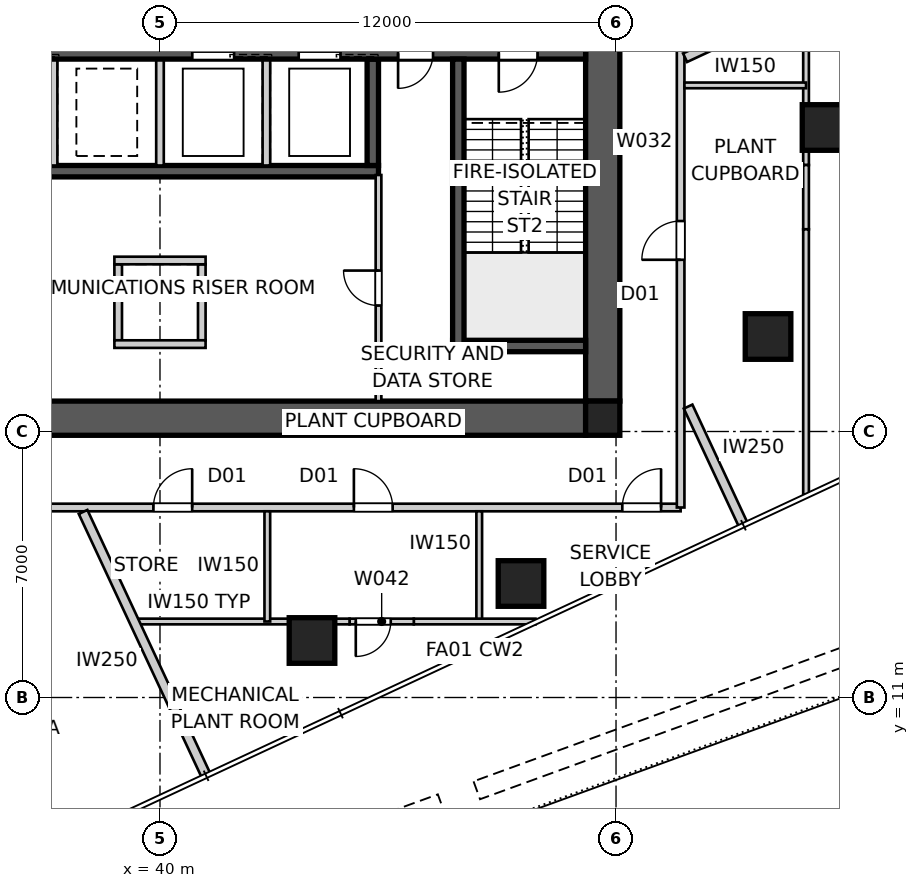
"""IFC4 building model, lengths in metres.
Left out: names, types, materials, properties, quantities, classifications, styles, units other than length and angle.
Written with IfcOpenShell. Run it as: python <this file> out.ifc"""

import sys

from ifc_helpers import new_model, si_unit, direction, frame, frame_2d, origin, origin_2d, place, context, subcontext, project, spatial, polyline, rectangle, outline, extrude, element, fill, save


model = new_model("IFC4")
c1 = context("Model", 3, precision=1e-05, world=origin(), true_north=direction((0.0, 1.0)))
c2 = subcontext(c1, "Body", "Model", "MODEL_VIEW")
j1 = project(units=[si_unit("LENGTHUNIT", "METRE"), si_unit("PLANEANGLEUNIT", "RADIAN")], contexts=[c1])
p1 = place(None, origin())
s1 = spatial("IfcSite", under=j1, at=p1, CompositionType="ELEMENT")
p2 = place(p1, origin())
s2 = spatial("IfcBuilding", under=s1, at=p2, CompositionType="ELEMENT")
p3 = place(p2, frame((0.0, 0.0, 171.0)))
s3 = spatial("IfcBuildingStorey", under=s2, at=p3, CompositionType="ELEMENT", Elevation=171.0)
p4 = place(p3, frame((51.2, 18.35, 0.0), z_axis=(0.0, 0.0, 1.0), x_axis=(-1.0, 0.0, 0.0)))
e1 = element("IfcWall", 1, at=p4, inside=s3, PredefinedType="SHEAR", context=c2, shape_type="SweptSolid", body=[
    extrude(outline(polyline([(0.0, -0.45), (22.4, -0.45), (22.4, -0.025), (22.85, -0.025), (22.85, 0.025), (22.4, 0.025), (22.4, 0.45), (0.0, 0.45), (0.0, 0.025), (-0.45, 0.025), (-0.45, -0.025), (0.0, -0.025), (0.0, -0.45)])), origin(), (0.0, 0.0, 1.0), 5.0),
])
p5 = place(p3, frame((51.65, 18.8, 0.0), z_axis=(0.0, 0.0, 1.0), x_axis=(0.0, 1.0, 0.0)))
e2 = element("IfcWall", 2, at=p5, inside=s3, PredefinedType="SHEAR", context=c2, shape_type="SweptSolid", body=[
    extrude(outline(polyline([(0.0, -0.45), (22.4, -0.45), (22.4, -0.025), (22.85, -0.025), (22.85, 0.025), (22.4, 0.025), (22.4, 0.45), (0.0, 0.45), (0.0, 0.025), (-0.45, 0.025), (-0.45, -0.025), (0.0, -0.025), (0.0, -0.45)])), origin(), (0.0, 0.0, 1.0), 5.0),
])
p6 = place(p5, frame((11.14, 0.0, 0.0)))
e3 = element("IfcOpeningElement", 3, at=p6, cuts=e2, PredefinedType="OPENING", context=c2, shape_type="SweptSolid", body=[
    extrude(rectangle(XDim=1.02, YDim=2.4, at=frame_2d((0.51, 1.2))), frame((0.0, 0.46, 0.0), z_axis=(0.0, -1.0, 0.0), x_axis=(1.0, 0.0, 0.0)), (0.0, 0.0, 1.0), 0.92),
])
p7 = place(p3, frame((51.2, 27.95, 0.0), z_axis=(0.0, 0.0, 1.0), x_axis=(-1.0, 0.0, 0.0)))
e4 = element("IfcWall", 4, at=p7, inside=s3, PredefinedType="SHEAR", context=c2, shape_type="SweptSolid", body=[
    extrude(rectangle(XDim=22.4, YDim=0.3, at=frame_2d((11.2, 0.0))), origin(), (0.0, 0.0, 1.0), 5.0),
])
p8 = place(p7, frame((19.04, 0.0, 0.0)))
e5 = element("IfcOpeningElement", 5, at=p8, cuts=e4, PredefinedType="OPENING", context=c2, shape_type="SweptSolid", body=[
    extrude(rectangle(XDim=0.92, YDim=2.1, at=frame_2d((0.46, 1.05))), frame((0.0, 0.16, 0.0), z_axis=(0.0, -1.0, 0.0), x_axis=(1.0, 0.0, 0.0)), (0.0, 0.0, 1.0), 0.32),
])
p9 = place(p7, frame((1.265, 0.0, 0.0)))
e6 = element("IfcOpeningElement", 6, at=p9, cuts=e4, PredefinedType="OPENING", context=c2, shape_type="SweptSolid", body=[
    extrude(rectangle(XDim=1.02, YDim=2.1, at=frame_2d((0.51, 1.05))), frame((0.0, 0.16, 0.0), z_axis=(0.0, -1.0, 0.0), x_axis=(1.0, 0.0, 0.0)), (0.0, 0.0, 1.0), 0.32),
])
p10 = place(p7, frame((4.015, 0.0, 0.0)))
e7 = element("IfcOpeningElement", 7, at=p10, cuts=e4, PredefinedType="OPENING", context=c2, shape_type="SweptSolid", body=[
    extrude(rectangle(XDim=0.92, YDim=2.1, at=frame_2d((0.46, 1.05))), frame((0.0, 0.16, 0.0), z_axis=(0.0, -1.0, 0.0), x_axis=(1.0, 0.0, 0.0)), (0.0, 0.0, 1.0), 0.32),
])
p11 = place(p7, frame((6.45, 0.0, 0.0)))
e8 = element("IfcOpeningElement", 8, at=p11, cuts=e4, PredefinedType="OPENING", context=c2, shape_type="SweptSolid", body=[
    extrude(rectangle(XDim=1.1, YDim=2.1, at=frame_2d((0.55, 1.05))), frame((0.0, 0.16, 0.0), z_axis=(0.0, -1.0, 0.0), x_axis=(1.0, 0.0, 0.0)), (0.0, 0.0, 1.0), 0.32),
])
p12 = place(p7, frame((9.25, 0.0, 0.0)))
e9 = element("IfcOpeningElement", 9, at=p12, cuts=e4, PredefinedType="OPENING", context=c2, shape_type="SweptSolid", body=[
    extrude(rectangle(XDim=1.1, YDim=2.1, at=frame_2d((0.55, 1.05))), frame((0.0, 0.16, 0.0), z_axis=(0.0, -1.0, 0.0), x_axis=(1.0, 0.0, 0.0)), (0.0, 0.0, 1.0), 0.32),
])
p13 = place(p7, frame((14.85, 0.0, 0.0)))
e10 = element("IfcOpeningElement", 10, at=p13, cuts=e4, PredefinedType="OPENING", context=c2, shape_type="SweptSolid", body=[
    extrude(rectangle(XDim=1.1, YDim=2.1, at=frame_2d((0.55, 1.05))), frame((0.0, 0.16, 0.0), z_axis=(0.0, -1.0, 0.0), x_axis=(1.0, 0.0, 0.0)), (0.0, 0.0, 1.0), 0.32),
])
p14 = place(p3, frame((45.75, 24.85, 0.0), z_axis=(0.0, 0.0, 1.0), x_axis=(-1.0, 0.0, 0.0)))
e11 = element("IfcWall", 11, at=p14, inside=s3, PredefinedType="SHEAR", context=c2, shape_type="SweptSolid", body=[
    extrude(rectangle(XDim=11.5, YDim=0.3, at=frame_2d((5.75, 0.0))), origin(), (0.0, 0.0, 1.0), 5.0),
])
p15 = place(p3, frame((45.6, 27.8, 0.0), z_axis=(0.0, 0.0, 1.0), x_axis=(0.0, -1.0, 0.0)))
e12 = element("IfcWall", 12, at=p15, inside=s3, PredefinedType="SHEAR", context=c2, shape_type="SweptSolid", body=[
    extrude(rectangle(XDim=2.8, YDim=0.3, at=frame_2d((1.4, 0.0))), origin(), (0.0, 0.0, 1.0), 5.0),
])
for number, where, z_axis, x_axis in (
    (13, (42.8, 27.8, 0.0), (0.0, 0.0, 1.0), (0.0, -1.0, 0.0)),
    (14, (40.0, 27.8, 0.0), (0.0, 0.0, 1.0), (0.0, -1.0, 0.0)),
    (15, (37.2, 27.8, 0.0), (0.0, 0.0, 1.0), (0.0, -1.0, 0.0)),
):
    element("IfcWall", number, at=place(p3, frame(where, z_axis=z_axis, x_axis=x_axis)), inside=s3, PredefinedType="SOLIDWALL", context=c2, shape_type="SweptSolid", body=[
        extrude(rectangle(XDim=2.8, YDim=0.2, at=frame_2d((1.4, 0.0))), origin(), (0.0, 0.0, 1.0), 5.0),
    ])
p16 = place(p3, frame((47.85, 27.8, 0.0), z_axis=(0.0, 0.0, 1.0), x_axis=(0.0, -1.0, 0.0)))
e16 = element("IfcWall", 16, at=p16, inside=s3, PredefinedType="SHEAR", context=c2, shape_type="SweptSolid", body=[
    extrude(rectangle(XDim=7.7, YDim=0.3, at=frame_2d((3.85, 0.0))), origin(), (0.0, 0.0, 1.0), 5.0),
])
p17 = place(p3, frame((51.2, 20.25, 0.0), z_axis=(0.0, 0.0, 1.0), x_axis=(-1.0, 0.0, 0.0)))
e17 = element("IfcWall", 17, at=p17, inside=s3, PredefinedType="SHEAR", context=c2, shape_type="SweptSolid", body=[
    extrude(rectangle(XDim=3.5, YDim=0.3, at=frame_2d((1.75, 0.0))), origin(), (0.0, 0.0, 1.0), 5.0),
])
for number, where, z_axis, x_axis in (
    (18, (38.9, 22.4, 0.0), (0.0, 0.0, 1.0), (0.0, -1.0, 0.0)),
    (19, (41.1, 22.4, 0.0), (0.0, 0.0, 1.0), (0.0, -1.0, 0.0)),
):
    element("IfcWall", number, at=place(p3, frame(where, z_axis=z_axis, x_axis=x_axis)), inside=s3, PredefinedType="SOLIDWALL", context=c2, shape_type="SweptSolid", body=[
        extrude(rectangle(XDim=2.0, YDim=0.2, at=frame_2d((1.0, 0.0))), origin(), (0.0, 0.0, 1.0), 5.0),
    ])
for number, where, z_axis, x_axis in (
    (20, (38.8, 22.5, 0.0), (0.0, 0.0, 1.0), (1.0, 0.0, 0.0)),
    (21, (38.8, 20.3, 0.0), (0.0, 0.0, 1.0), (1.0, 0.0, 0.0)),
):
    element("IfcWall", number, at=place(p3, frame(where, z_axis=z_axis, x_axis=x_axis)), inside=s3, PredefinedType="SOLIDWALL", context=c2, shape_type="SweptSolid", body=[
        extrude(rectangle(XDim=2.4, YDim=0.2, at=frame_2d((1.2, 0.0))), origin(), (0.0, 0.0, 1.0), 5.0),
    ])
p18 = place(p3, frame((51.65, 18.35, 0.0), z_axis=(0.0, 0.0, 1.0), x_axis=(1.0, 0.0, 0.0)))
e22 = element("IfcColumn", 22, at=p18, inside=s3, PredefinedType="COLUMN", context=c2, shape_type="SweptSolid", body=[
    extrude(rectangle(XDim=0.9, YDim=0.9, at=origin_2d()), origin(), (0.0, 0.0, 1.0), 5.0),
])
for number, where, z_axis, x_axis in (
    (23, (57.5, 26.0, 0.0), (0.0, 0.0, 1.0), (1.0, 0.0, 0.0)),
    (24, (44.0, 12.5, 0.0), (0.0, 0.0, 1.0), (1.0, 0.0, 0.0)),
    (25, (49.5, 14.0, 0.0), (0.0, 0.0, 1.0), (1.0, 0.0, 0.0)),
    (26, (56.0, 20.5, 0.0), (0.0, 0.0, 1.0), (1.0, 0.0, 0.0)),
):
    element("IfcColumn", number, at=place(p3, frame(where, z_axis=z_axis, x_axis=x_axis)), inside=s3, PredefinedType="COLUMN", context=c2, shape_type="SweptSolid", body=[
        extrude(rectangle(XDim=1.2, YDim=1.2, at=origin_2d()), origin(), (0.0, 0.0, 1.0), 5.0),
    ])
p19 = place(p3, frame((26.3, 16.0, 0.0), z_axis=(0.0, 0.0, 1.0), x_axis=(1.0, 0.0, 0.0)))
e27 = element("IfcWall", 27, at=p19, inside=s3, PredefinedType="PARTITIONING", context=c2, shape_type="SweptSolid", body=[
    extrude(rectangle(XDim=27.4, YDim=0.2, at=frame_2d((13.7, 0.0))), origin(), (0.0, 0.0, 1.0), 4.85),
])
p20 = place(p19, frame((18.802, 0.0, 0.0)))
e28 = element("IfcOpeningElement", 28, at=p20, cuts=e27, PredefinedType="OPENING", context=c2, shape_type="SweptSolid", body=[
    extrude(rectangle(XDim=1.02, YDim=2.34, at=frame_2d((0.51, 1.17))), frame((0.0, 0.11, 0.0), z_axis=(0.0, -1.0, 0.0), x_axis=(1.0, 0.0, 0.0)), (0.0, 0.0, 1.0), 0.22),
])
p21 = place(p19, frame((13.527, 0.0, 0.0)))
e29 = element("IfcOpeningElement", 29, at=p21, cuts=e27, PredefinedType="OPENING", context=c2, shape_type="SweptSolid", body=[
    extrude(rectangle(XDim=1.02, YDim=2.34, at=frame_2d((0.51, 1.17))), frame((0.0, 0.11, 0.0), z_axis=(0.0, -1.0, 0.0), x_axis=(1.0, 0.0, 0.0)), (0.0, 0.0, 1.0), 0.22),
])
p22 = place(p19, frame((25.865, 0.0, 0.0)))
e30 = element("IfcOpeningElement", 30, at=p22, cuts=e27, PredefinedType="OPENING", context=c2, shape_type="SweptSolid", body=[
    extrude(rectangle(XDim=1.02, YDim=2.34, at=frame_2d((0.51, 1.17))), frame((0.0, 0.11, 0.0), z_axis=(0.0, -1.0, 0.0), x_axis=(1.0, 0.0, 0.0)), (0.0, 0.0, 1.0), 0.22),
])
p23 = place(p3, frame((53.7, 16.0, 0.0), z_axis=(0.0, 0.0, 1.0), x_axis=(0.0, 1.0, 0.0)))
e31 = element("IfcWall", 31, at=p23, inside=s3, PredefinedType="PARTITIONING", context=c2, shape_type="SweptSolid", body=[
    extrude(rectangle(XDim=27.7, YDim=0.2, at=frame_2d((13.85, 0.0))), origin(), (0.0, 0.0, 1.0), 4.85),
])
p24 = place(p23, frame((22.176, 0.0, 0.0)))
e32 = element("IfcOpeningElement", 32, at=p24, cuts=e31, PredefinedType="OPENING", context=c2, shape_type="SweptSolid", body=[
    extrude(rectangle(XDim=1.02, YDim=2.34, at=frame_2d((0.51, 1.17))), frame((0.0, 0.11, 0.0), z_axis=(0.0, -1.0, 0.0), x_axis=(1.0, 0.0, 0.0)), (0.0, 0.0, 1.0), 0.22),
])
p25 = place(p23, frame((6.519, 0.0, 0.0)))
e33 = element("IfcOpeningElement", 33, at=p25, cuts=e31, PredefinedType="OPENING", context=c2, shape_type="SweptSolid", body=[
    extrude(rectangle(XDim=1.02, YDim=2.34, at=frame_2d((0.51, 1.17))), frame((0.0, 0.11, 0.0), z_axis=(0.0, -1.0, 0.0), x_axis=(1.0, 0.0, 0.0)), (0.0, 0.0, 1.0), 0.22),
])
p26 = place(p23, frame((14.505, 0.0, 0.0)))
e34 = element("IfcOpeningElement", 34, at=p26, cuts=e31, PredefinedType="OPENING", context=c2, shape_type="SweptSolid", body=[
    extrude(rectangle(XDim=1.02, YDim=2.34, at=frame_2d((0.51, 1.17))), frame((0.0, 0.11, 0.0), z_axis=(0.0, -1.0, 0.0), x_axis=(1.0, 0.0, 0.0)), (0.0, 0.0, 1.0), 0.22),
])
p27 = place(p3, frame((41.214, 8.94, 0.0), z_axis=(0.0, 0.0, 1.0), x_axis=(-0.42261155821, 0.906310912914, 0.0)))
e35 = element("IfcWall", 35, at=p27, inside=s3, PredefinedType="PARTITIONING", context=c2, shape_type="SweptSolid", body=[
    extrude(rectangle(XDim=7.661, YDim=0.25, at=frame_2d((3.831, 0.0))), origin(), (0.0, 0.0, 1.0), 4.85),
])
p28 = place(p3, frame((55.353, 15.533, 0.0), z_axis=(0.0, 0.0, 1.0), x_axis=(-0.422586759932, 0.906322475905, 0.0)))
e36 = element("IfcWall", 36, at=p28, inside=s3, PredefinedType="PARTITIONING", context=c2, shape_type="SweptSolid", body=[
    extrude(rectangle(XDim=3.446, YDim=0.25, at=frame_2d((1.723, 0.0))), origin(), (0.0, 0.0, 1.0), 4.85),
])
p29 = place(p3, frame((61.06, 31.214, 0.0), z_axis=(0.0, 0.0, 1.0), x_axis=(-0.906306405344, -0.422621224778, 0.0)))
e37 = element("IfcWall", 37, at=p29, inside=s3, PredefinedType="PARTITIONING", context=c2, shape_type="SweptSolid", body=[
    extrude(rectangle(XDim=7.992, YDim=0.25, at=frame_2d((3.996, 0.0))), origin(), (0.0, 0.0, 1.0), 4.85),
])
p30 = place(p3, frame((45.75, 18.8, 0.0), z_axis=(0.0, 0.0, 1.0), x_axis=(0.0, 1.0, 0.0)))
e38 = element("IfcWall", 38, at=p30, inside=s3, PredefinedType="SOLIDWALL", context=c2, shape_type="SweptSolid", body=[
    extrude(rectangle(XDim=5.95, YDim=0.15, at=frame_2d((2.975, 0.0))), origin(), (0.0, 0.0, 1.0), 4.85),
])
p31 = place(p30, frame((2.515, 0.0, 0.0)))
e39 = element("IfcOpeningElement", 39, at=p31, cuts=e38, PredefinedType="OPENING", context=c2, shape_type="SweptSolid", body=[
    extrude(rectangle(XDim=0.92, YDim=2.1, at=frame_2d((0.46, 1.05))), frame((0.0, 0.085, 0.0), z_axis=(0.0, -1.0, 0.0), x_axis=(1.0, 0.0, 0.0)), (0.0, 0.0, 1.0), 0.17),
])
p32 = place(p3, frame((48.4, 13.0, 0.0), z_axis=(0.0, 0.0, 1.0), x_axis=(0.0, 1.0, 0.0)))
e40 = element("IfcWall", 40, at=p32, inside=s3, PredefinedType="SOLIDWALL", context=c2, shape_type="SweptSolid", body=[
    extrude(rectangle(XDim=2.9, YDim=0.15, at=frame_2d((1.45, 0.0))), origin(), (0.0, 0.0, 1.0), 4.85),
])
p33 = place(p3, frame((49.881, 13.0, 0.0), z_axis=(0.0, 0.0, 1.0), x_axis=(-1.0, 0.0, 0.0)))
e41 = element("IfcWall", 41, at=p33, inside=s3, PredefinedType="SOLIDWALL", context=c2, shape_type="SweptSolid", body=[
    extrude(rectangle(XDim=3.202, YDim=0.15, at=frame_2d((1.601, 0.0))), origin(), (0.0, 0.0, 1.0), 4.85),
])
p34 = place(p3, frame((46.678, 13.0, 0.0), z_axis=(0.0, 0.0, 1.0), x_axis=(-1.0, 0.0, 0.0)))
e42 = element("IfcWall", 42, at=p34, inside=s3, PredefinedType="SOLIDWALL", context=c2, shape_type="SweptSolid", body=[
    extrude(rectangle(XDim=1.69, YDim=0.15, at=frame_2d((0.845, 0.0))), origin(), (0.0, 0.0, 1.0), 3.85),
])
p35 = place(p34, frame((0.606, 0.0, 0.0)))
e43 = element("IfcOpeningElement", 43, at=p35, cuts=e42, PredefinedType="OPENING", context=c2, shape_type="SweptSolid", body=[
    extrude(rectangle(XDim=0.92, YDim=2.1, at=frame_2d((0.46, 1.05))), frame((0.0, 0.085, 0.0), z_axis=(0.0, -1.0, 0.0), x_axis=(1.0, 0.0, 0.0)), (0.0, 0.0, 1.0), 0.17),
])
p36 = place(p3, frame((44.988, 13.0, 0.0), z_axis=(0.0, 0.0, 1.0), x_axis=(-1.0, 0.0, 0.0)))
e44 = element("IfcWall", 44, at=p36, inside=s3, PredefinedType="SOLIDWALL", context=c2, shape_type="SweptSolid", body=[
    extrude(rectangle(XDim=5.667, YDim=0.15, at=frame_2d((2.834, 0.0))), origin(), (0.0, 0.0, 1.0), 4.85),
])
p37 = place(p3, frame((42.824, 13.0, 0.0), z_axis=(0.0, 0.0, 1.0), x_axis=(0.0, 1.0, 0.0)))
e45 = element("IfcWall", 45, at=p37, inside=s3, PredefinedType="SOLIDWALL", context=c2, shape_type="SweptSolid", body=[
    extrude(rectangle(XDim=2.9, YDim=0.15, at=frame_2d((1.45, 0.0))), origin(), (0.0, 0.0, 1.0), 4.322),
])
p38 = place(p3, frame((57.0, 34.988, 0.0), z_axis=(0.0, 0.0, 1.0), x_axis=(0.0, -1.0, 0.0)))
e46 = element("IfcWall", 46, at=p38, inside=s3, PredefinedType="SOLIDWALL", context=c2, shape_type="SweptSolid", body=[
    extrude(rectangle(XDim=9.977, YDim=0.15, at=frame_2d((4.988, 0.0))), origin(), (0.0, 0.0, 1.0), 4.85),
])
p39 = place(p3, frame((57.0, 25.012, 0.0), z_axis=(0.0, 0.0, 1.0), x_axis=(0.0, -1.0, 0.0)))
e47 = element("IfcWall", 47, at=p39, inside=s3, PredefinedType="SOLIDWALL", context=c2, shape_type="SweptSolid", body=[
    extrude(rectangle(XDim=1.69, YDim=0.15, at=frame_2d((0.845, 0.0))), origin(), (0.0, 0.0, 1.0), 3.85),
])
p40 = place(p3, frame((57.0, 23.322, 0.0), z_axis=(0.0, 0.0, 1.0), x_axis=(0.0, -1.0, 0.0)))
e48 = element("IfcWall", 48, at=p40, inside=s3, PredefinedType="SOLIDWALL", context=c2, shape_type="SweptSolid", body=[
    extrude(rectangle(XDim=6.976, YDim=0.15, at=frame_2d((3.488, 0.0))), origin(), (0.0, 0.0, 1.0), 4.85),
])
p41 = place(p3, frame((53.8, 27.108, 0.0), z_axis=(0.0, 0.0, 1.0), x_axis=(1.0, 0.0, 0.0)))
e49 = element("IfcWall", 49, at=p41, inside=s3, PredefinedType="SOLIDWALL", context=c2, shape_type="SweptSolid", body=[
    extrude(rectangle(XDim=3.2, YDim=0.15, at=frame_2d((1.6, 0.0))), origin(), (0.0, 0.0, 1.0), 4.322),
])
p42 = place(p9, origin())
e50 = element("IfcDoor", 50, at=p42, inside=s3, OperationType="SINGLE_SWING_RIGHT", PredefinedType="DOOR", context=c2, shape_type="SweptSolid", body=[
    extrude(rectangle(XDim=1.02, YDim=2.1, at=frame_2d((0.51, 1.05))), frame((0.0, 0.025, 0.0), z_axis=(0.0, -1.0, 0.0), x_axis=(1.0, 0.0, 0.0)), (0.0, 0.0, 1.0), 0.05),
])
fill(e6, e50)
p43 = place(p10, origin())
e51 = element("IfcDoor", 51, at=p43, inside=s3, OperationType="SINGLE_SWING_RIGHT", PredefinedType="DOOR", context=c2, shape_type="SweptSolid", body=[
    extrude(rectangle(XDim=0.92, YDim=2.1, at=frame_2d((0.46, 1.05))), frame((0.0, 0.025, 0.0), z_axis=(0.0, -1.0, 0.0), x_axis=(1.0, 0.0, 0.0)), (0.0, 0.0, 1.0), 0.05),
])
fill(e7, e51)
p44 = place(p25, origin())
e52 = element("IfcDoor", 52, at=p44, inside=s3, OperationType="SINGLE_SWING_LEFT", PredefinedType="DOOR", context=c2, shape_type="SweptSolid", body=[
    extrude(rectangle(XDim=1.02, YDim=2.34, at=frame_2d((0.51, 1.17))), frame((0.0, 0.025, 0.0), z_axis=(0.0, -1.0, 0.0), x_axis=(1.0, 0.0, 0.0)), (0.0, 0.0, 1.0), 0.05),
])
fill(e33, e52)
p45 = place(p20, origin())
e53 = element("IfcDoor", 53, at=p45, inside=s3, OperationType="SINGLE_SWING_LEFT", PredefinedType="DOOR", context=c2, shape_type="SweptSolid", body=[
    extrude(rectangle(XDim=1.02, YDim=2.34, at=frame_2d((0.51, 1.17))), frame((0.0, 0.025, 0.0), z_axis=(0.0, -1.0, 0.0), x_axis=(1.0, 0.0, 0.0)), (0.0, 0.0, 1.0), 0.05),
])
fill(e28, e53)
p46 = place(p21, origin())
e54 = element("IfcDoor", 54, at=p46, inside=s3, OperationType="SINGLE_SWING_RIGHT", PredefinedType="DOOR", context=c2, shape_type="SweptSolid", body=[
    extrude(rectangle(XDim=1.02, YDim=2.34, at=frame_2d((0.51, 1.17))), frame((0.0, 0.025, 0.0), z_axis=(0.0, -1.0, 0.0), x_axis=(1.0, 0.0, 0.0)), (0.0, 0.0, 1.0), 0.05),
])
fill(e29, e54)
p47 = place(p22, origin())
e55 = element("IfcDoor", 55, at=p47, inside=s3, OperationType="SINGLE_SWING_RIGHT", PredefinedType="DOOR", context=c2, shape_type="SweptSolid", body=[
    extrude(rectangle(XDim=1.02, YDim=2.34, at=frame_2d((0.51, 1.17))), frame((0.0, 0.025, 0.0), z_axis=(0.0, -1.0, 0.0), x_axis=(1.0, 0.0, 0.0)), (0.0, 0.0, 1.0), 0.05),
])
fill(e30, e55)
p48 = place(p31, origin())
e56 = element("IfcDoor", 56, at=p48, inside=s3, OperationType="SINGLE_SWING_RIGHT", PredefinedType="DOOR", context=c2, shape_type="SweptSolid", body=[
    extrude(rectangle(XDim=0.92, YDim=2.1, at=frame_2d((0.46, 1.05))), frame((0.0, 0.025, 0.0), z_axis=(0.0, -1.0, 0.0), x_axis=(1.0, 0.0, 0.0)), (0.0, 0.0, 1.0), 0.05),
])
fill(e39, e56)
p49 = place(p35, origin())
e57 = element("IfcDoor", 57, at=p49, inside=s3, OperationType="SINGLE_SWING_RIGHT", PredefinedType="DOOR", context=c2, shape_type="SweptSolid", body=[
    extrude(rectangle(XDim=0.92, YDim=2.1, at=frame_2d((0.46, 1.05))), frame((0.0, 0.025, 0.0), z_axis=(0.0, -1.0, 0.0), x_axis=(1.0, 0.0, 0.0)), (0.0, 0.0, 1.0), 0.05),
])
fill(e43, e57)
p50 = place(p11, origin())
e58 = element("IfcDoor", 58, at=p50, inside=s3, OperationType="SLIDING_TO_LEFT", PredefinedType="DOOR", context=c2, shape_type="SweptSolid", body=[
    extrude(rectangle(XDim=1.1, YDim=2.1, at=frame_2d((0.55, 1.05))), frame((0.0, 0.025, 0.0), z_axis=(0.0, -1.0, 0.0), x_axis=(1.0, 0.0, 0.0)), (0.0, 0.0, 1.0), 0.05),
])
fill(e8, e58)
p51 = place(p12, origin())
e59 = element("IfcDoor", 59, at=p51, inside=s3, OperationType="SLIDING_TO_LEFT", PredefinedType="DOOR", context=c2, shape_type="SweptSolid", body=[
    extrude(rectangle(XDim=1.1, YDim=2.1, at=frame_2d((0.55, 1.05))), frame((0.0, 0.025, 0.0), z_axis=(0.0, -1.0, 0.0), x_axis=(1.0, 0.0, 0.0)), (0.0, 0.0, 1.0), 0.05),
])
fill(e9, e59)
save(model, sys.argv[1])
